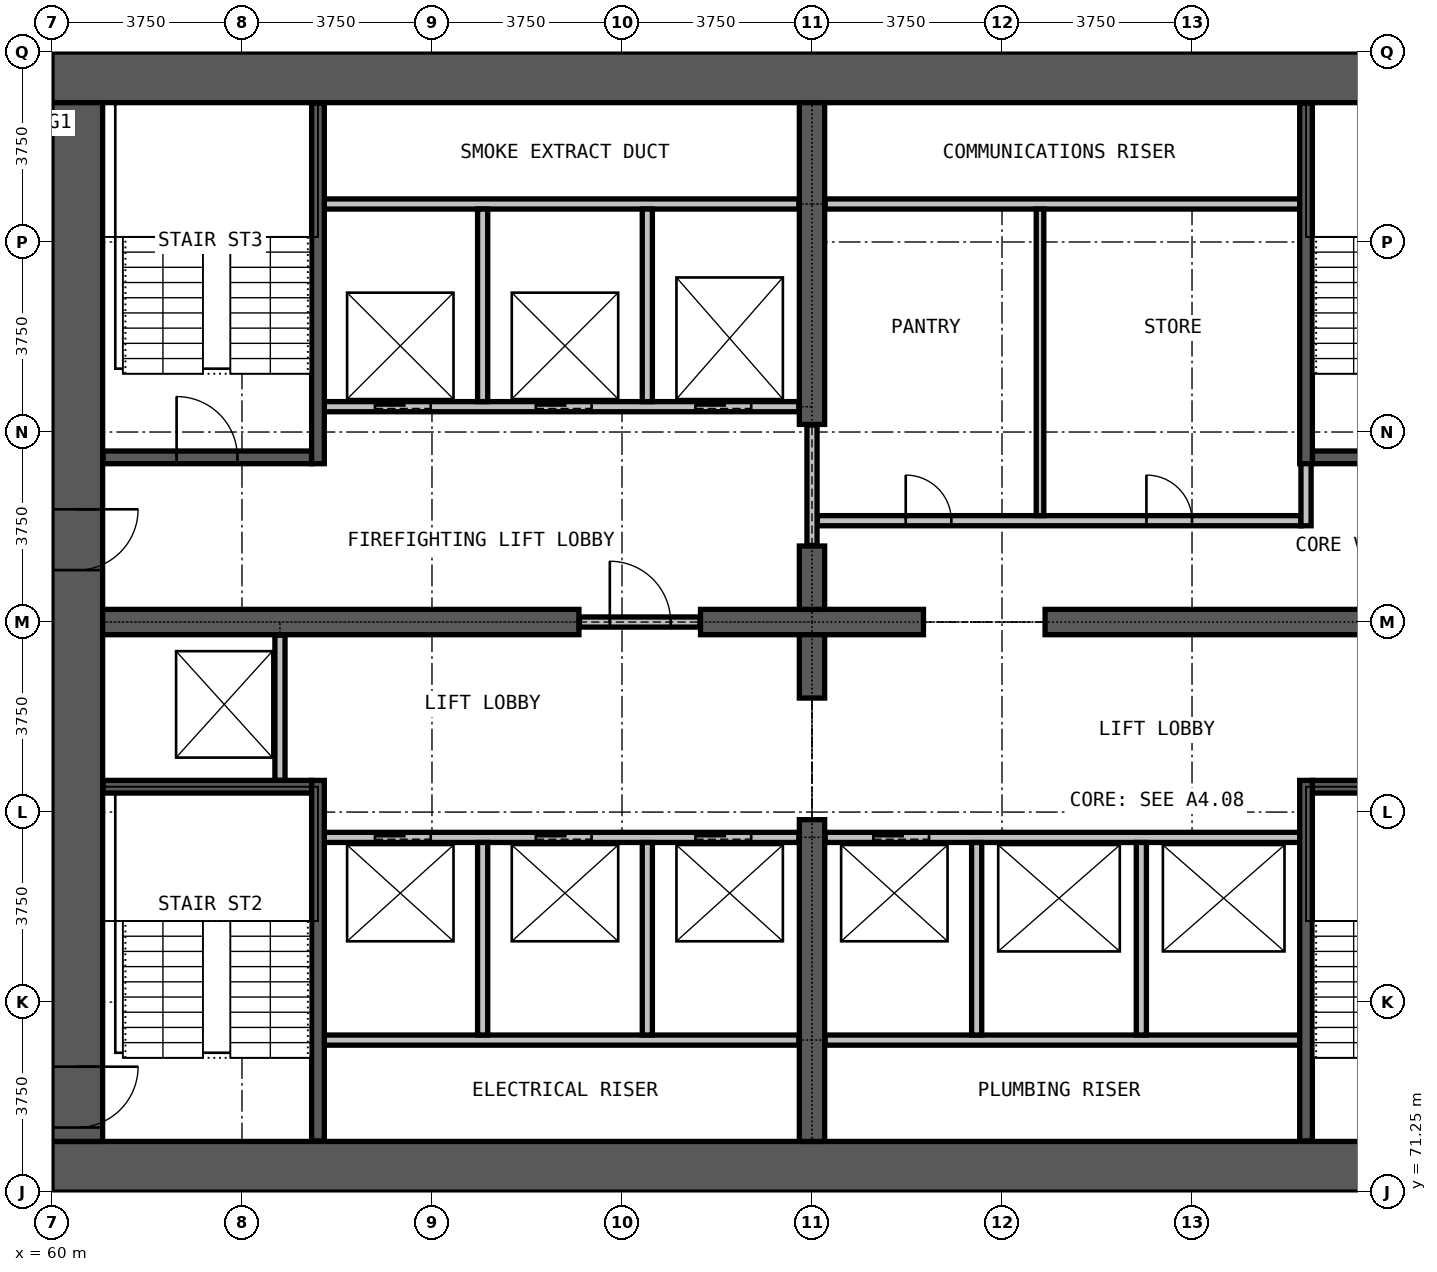
"""IFC4 building model, lengths in metres.
Left out: names, types, materials, properties, quantities, classifications, styles, units other than length and angle.
Written with IfcOpenShell. Run it as: python <this file> out.ifc"""

import sys

from ifc_helpers import new_model, si_unit, direction, frame, frame_2d, origin, place, context, subcontext, project, spatial, rectangle, extrude, element, fill, save


model = new_model("IFC4")
c1 = context("Model", 3, precision=1e-05, world=origin(), true_north=direction((0.0, 1.0)))
c2 = subcontext(c1, "Body", "Model", "MODEL_VIEW")
j1 = project(units=[si_unit("LENGTHUNIT", "METRE"), si_unit("PLANEANGLEUNIT", "RADIAN")], contexts=[c1])
p1 = place(None, origin())
s1 = spatial("IfcSite", under=j1, at=p1, CompositionType="ELEMENT")
p2 = place(p1, origin())
s2 = spatial("IfcBuilding", under=s1, at=p2, CompositionType="ELEMENT")
p3 = place(p2, frame((0.0, 0.0, 85.7)))
s3 = spatial("IfcBuildingStorey", under=s2, at=p3, CompositionType="ELEMENT", Elevation=85.7)
for number, where, z_axis, x_axis in (
    (1, (60.0, 71.75, 0.0), (0.0, 0.0, 1.0), (1.0, 0.0, 0.0)),
    (2, (90.0, 93.25, 0.0), (0.0, 0.0, 1.0), (-1.0, 0.0, 0.0)),
):
    element("IfcWall", number, at=place(p3, frame(where, z_axis=z_axis, x_axis=x_axis)), inside=s3, PredefinedType="SHEAR", context=c2, shape_type="SweptSolid", body=[
        extrude(rectangle(XDim=30.0, YDim=1.0, at=frame_2d((15.0, 0.0))), origin(), (0.0, 0.0, 1.0), 3.3),
    ])
p4 = place(p3, frame((60.5, 92.75, 0.0), z_axis=(0.0, 0.0, 1.0), x_axis=(0.0, -1.0, 0.0)))
e3 = element("IfcWall", 3, at=p4, inside=s3, PredefinedType="SHEAR", context=c2, shape_type="SweptSolid", body=[
    extrude(rectangle(XDim=20.5, YDim=1.0, at=frame_2d((10.25, 0.0))), origin(), (0.0, 0.0, 1.0), 3.3),
])
p5 = place(p4, frame((19.025, 0.0, 0.0)))
e4 = element("IfcOpeningElement", 4, at=p5, cuts=e3, PredefinedType="OPENING", context=c2, shape_type="SweptSolid", body=[
    extrude(rectangle(XDim=1.2, YDim=2.2, at=frame_2d((0.6, 1.1))), frame((0.0, 0.51, 0.0), z_axis=(0.0, -1.0, 0.0), x_axis=(1.0, 0.0, 0.0)), (0.0, 0.0, 1.0), 1.02),
])
p6 = place(p4, frame((8.025, 0.0, 0.0)))
e5 = element("IfcOpeningElement", 5, at=p6, cuts=e3, PredefinedType="OPENING", context=c2, shape_type="SweptSolid", body=[
    extrude(rectangle(XDim=1.2, YDim=2.2, at=frame_2d((0.6, 1.1))), frame((0.0, 0.51, 0.0), z_axis=(0.0, -1.0, 0.0), x_axis=(1.0, 0.0, 0.0)), (0.0, 0.0, 1.0), 1.02),
])
p7 = place(p3, frame((61.0, 82.5, 0.0), z_axis=(0.0, 0.0, 1.0), x_axis=(1.0, 0.0, 0.0)))
e6 = element("IfcWall", 6, at=p7, inside=s3, PredefinedType="SHEAR", context=c2, shape_type="SweptSolid", body=[
    extrude(rectangle(XDim=9.4, YDim=0.5, at=frame_2d((4.7, 0.0))), origin(), (0.0, 0.0, 1.0), 3.3),
])
p8 = place(p3, frame((72.8, 82.5, 0.0), z_axis=(0.0, 0.0, 1.0), x_axis=(1.0, 0.0, 0.0)))
e7 = element("IfcWall", 7, at=p8, inside=s3, PredefinedType="SHEAR", context=c2, shape_type="SweptSolid", body=[
    extrude(rectangle(XDim=4.4, YDim=0.5, at=frame_2d((2.2, 0.0))), origin(), (0.0, 0.0, 1.0), 3.3),
])
p9 = place(p3, frame((79.6, 82.5, 0.0), z_axis=(0.0, 0.0, 1.0), x_axis=(1.0, 0.0, 0.0)))
e8 = element("IfcWall", 8, at=p9, inside=s3, PredefinedType="SHEAR", context=c2, shape_type="SweptSolid", body=[
    extrude(rectangle(XDim=9.4, YDim=0.5, at=frame_2d((4.7, 0.0))), origin(), (0.0, 0.0, 1.0), 3.3),
])
p10 = place(p3, frame((75.0, 72.25, 0.0), z_axis=(0.0, 0.0, 1.0), x_axis=(0.0, 1.0, 0.0)))
e9 = element("IfcWall", 9, at=p10, inside=s3, PredefinedType="SHEAR", context=c2, shape_type="SweptSolid", body=[
    extrude(rectangle(XDim=6.35, YDim=0.5, at=frame_2d((3.175, 0.0))), origin(), (0.0, 0.0, 1.0), 3.3),
])
for number, where, z_axis, x_axis in (
    (10, (75.0, 81.0, 0.0), (0.0, 0.0, 1.0), (0.0, 1.0, 0.0)),
    (11, (75.0, 82.75, 0.0), (0.0, 0.0, 1.0), (0.0, 1.0, 0.0)),
):
    element("IfcWall", number, at=place(p3, frame(where, z_axis=z_axis, x_axis=x_axis)), inside=s3, PredefinedType="SHEAR", context=c2, shape_type="SweptSolid", body=[
        extrude(rectangle(XDim=1.25, YDim=0.5, at=frame_2d((0.625, 0.0))), origin(), (0.0, 0.0, 1.0), 3.3),
    ])
p11 = place(p3, frame((75.0, 86.4, 0.0), z_axis=(0.0, 0.0, 1.0), x_axis=(0.0, 1.0, 0.0)))
e12 = element("IfcWall", 12, at=p11, inside=s3, PredefinedType="SHEAR", context=c2, shape_type="SweptSolid", body=[
    extrude(rectangle(XDim=6.35, YDim=0.5, at=frame_2d((3.175, 0.0))), origin(), (0.0, 0.0, 1.0), 3.3),
])
p12 = place(p3, frame((70.41, 82.5, 0.0), z_axis=(0.0, 0.0, 1.0), x_axis=(1.0, 0.0, 0.0)))
e13 = element("IfcWall", 13, at=p12, inside=s3, PredefinedType="PARTITIONING", context=c2, shape_type="SweptSolid", body=[
    extrude(rectangle(XDim=2.38, YDim=0.2, at=frame_2d((1.19, 0.0))), origin(), (0.0, 0.0, 1.0), 2.4),
])
p13 = place(p12, frame((0.6, 0.0, 0.0)))
e14 = element("IfcOpeningElement", 14, at=p13, cuts=e13, PredefinedType="OPENING", context=c2, shape_type="SweptSolid", body=[
    extrude(rectangle(XDim=1.2, YDim=2.2, at=frame_2d((0.6, 1.1))), frame((0.0, 0.11, 0.0), z_axis=(0.0, -1.0, 0.0), x_axis=(1.0, 0.0, 0.0)), (0.0, 0.0, 1.0), 0.22),
])
p14 = place(p3, frame((75.1, 84.5, 0.0), z_axis=(0.0, 0.0, 1.0), x_axis=(1.0, 0.0, 0.0)))
e15 = element("IfcWall", 15, at=p14, inside=s3, PredefinedType="PARTITIONING", context=c2, shape_type="SweptSolid", body=[
    extrude(rectangle(XDim=9.55, YDim=0.2, at=frame_2d((4.775, 0.0))), origin(), (0.0, 0.0, 1.0), 3.0),
])
p15 = place(p14, frame((1.75, 0.0, 0.0)))
e16 = element("IfcOpeningElement", 16, at=p15, cuts=e15, PredefinedType="OPENING", context=c2, shape_type="SweptSolid", body=[
    extrude(rectangle(XDim=0.9, YDim=2.2, at=frame_2d((0.45, 1.1))), frame((0.0, 0.11, 0.0), z_axis=(0.0, -1.0, 0.0), x_axis=(1.0, 0.0, 0.0)), (0.0, 0.0, 1.0), 0.22),
])
p16 = place(p14, frame((6.5, 0.0, 0.0)))
e17 = element("IfcOpeningElement", 17, at=p16, cuts=e15, PredefinedType="OPENING", context=c2, shape_type="SweptSolid", body=[
    extrude(rectangle(XDim=0.9, YDim=2.2, at=frame_2d((0.45, 1.1))), frame((0.0, 0.11, 0.0), z_axis=(0.0, -1.0, 0.0), x_axis=(1.0, 0.0, 0.0)), (0.0, 0.0, 1.0), 0.22),
])
p17 = place(p3, frame((75.26, 90.75, 0.0), z_axis=(0.0, 0.0, 1.0), x_axis=(1.0, 0.0, 0.0)))
e18 = element("IfcWall", 18, at=p17, inside=s3, PredefinedType="PARTITIONING", context=c2, shape_type="SweptSolid", body=[
    extrude(rectangle(XDim=9.365, YDim=0.2, at=frame_2d((4.683, 0.0))), origin(), (0.0, 0.0, 1.0), 3.0),
])
p18 = place(p3, frame((75.0, 84.01, 0.0), z_axis=(0.0, 0.0, 1.0), x_axis=(0.0, 1.0, 0.0)))
e19 = element("IfcWall", 19, at=p18, inside=s3, PredefinedType="PARTITIONING", context=c2, shape_type="SweptSolid", body=[
    extrude(rectangle(XDim=2.38, YDim=0.2, at=frame_2d((1.19, 0.0))), origin(), (0.0, 0.0, 1.0), 2.4),
])
p19 = place(p3, frame((84.75, 84.4, 0.0), z_axis=(0.0, 0.0, 1.0), x_axis=(0.0, 1.0, 0.0)))
e20 = element("IfcWall", 20, at=p19, inside=s3, PredefinedType="PARTITIONING", context=c2, shape_type="SweptSolid", body=[
    extrude(rectangle(XDim=1.475, YDim=0.2, at=frame_2d((0.738, 0.0))), origin(), (0.0, 0.0, 1.0), 3.0),
])
p20 = place(p3, frame((79.5, 84.6, 0.0), z_axis=(0.0, 0.0, 1.0), x_axis=(0.0, 1.0, 0.0)))
e21 = element("IfcWall", 21, at=p20, inside=s3, PredefinedType="PARTITIONING", context=c2, shape_type="SweptSolid", body=[
    extrude(rectangle(XDim=6.05, YDim=0.15, at=frame_2d((3.025, 0.0))), origin(), (0.0, 0.0, 1.0), 3.0),
])
for number, where, z_axis, x_axis in (
    (22, (65.375, 74.25, 0.0), (0.0, 0.0, 1.0), (1.0, 0.0, 0.0)),
    (23, (75.26, 74.25, 0.0), (0.0, 0.0, 1.0), (1.0, 0.0, 0.0)),
):
    element("IfcWall", number, at=place(p3, frame(where, z_axis=z_axis, x_axis=x_axis)), inside=s3, PredefinedType="PARTITIONING", context=c2, shape_type="SweptSolid", body=[
        extrude(rectangle(XDim=9.365, YDim=0.2, at=frame_2d((4.683, 0.0))), origin(), (0.0, 0.0, 1.0), 3.0),
    ])
p21 = place(p3, frame((65.375, 78.25, 0.0), z_axis=(0.0, 0.0, 1.0), x_axis=(1.0, 0.0, 0.0)))
e24 = element("IfcWall", 24, at=p21, inside=s3, PredefinedType="PARTITIONING", context=c2, shape_type="SweptSolid", body=[
    extrude(rectangle(XDim=9.365, YDim=0.2, at=frame_2d((4.683, 0.0))), origin(), (0.0, 0.0, 1.0), 3.0),
])
p22 = place(p21, frame((1.0, 0.0, 0.0)))
e25 = element("IfcOpeningElement", 25, at=p22, cuts=e24, PredefinedType="OPENING", context=c2, shape_type="SweptSolid", body=[
    extrude(rectangle(XDim=1.1, YDim=2.2, at=frame_2d((0.55, 1.1))), frame((0.0, 0.11, 0.0), z_axis=(0.0, -1.0, 0.0), x_axis=(1.0, 0.0, 0.0)), (0.0, 0.0, 1.0), 0.22),
])
p23 = place(p21, frame((4.175, 0.0, 0.0)))
e26 = element("IfcOpeningElement", 26, at=p23, cuts=e24, PredefinedType="OPENING", context=c2, shape_type="SweptSolid", body=[
    extrude(rectangle(XDim=1.1, YDim=2.2, at=frame_2d((0.55, 1.1))), frame((0.0, 0.11, 0.0), z_axis=(0.0, -1.0, 0.0), x_axis=(1.0, 0.0, 0.0)), (0.0, 0.0, 1.0), 0.22),
])
p24 = place(p21, frame((7.325, 0.0, 0.0)))
e27 = element("IfcOpeningElement", 27, at=p24, cuts=e24, PredefinedType="OPENING", context=c2, shape_type="SweptSolid", body=[
    extrude(rectangle(XDim=1.1, YDim=2.2, at=frame_2d((0.55, 1.1))), frame((0.0, 0.11, 0.0), z_axis=(0.0, -1.0, 0.0), x_axis=(1.0, 0.0, 0.0)), (0.0, 0.0, 1.0), 0.22),
])
p25 = place(p3, frame((75.26, 78.25, 0.0), z_axis=(0.0, 0.0, 1.0), x_axis=(1.0, 0.0, 0.0)))
e28 = element("IfcWall", 28, at=p25, inside=s3, PredefinedType="PARTITIONING", context=c2, shape_type="SweptSolid", body=[
    extrude(rectangle(XDim=9.365, YDim=0.2, at=frame_2d((4.683, 0.0))), origin(), (0.0, 0.0, 1.0), 3.0),
])
p26 = place(p25, frame((0.95, 0.0, 0.0)))
e29 = element("IfcOpeningElement", 29, at=p26, cuts=e28, PredefinedType="OPENING", context=c2, shape_type="SweptSolid", body=[
    extrude(rectangle(XDim=1.1, YDim=2.2, at=frame_2d((0.55, 1.1))), frame((0.0, 0.11, 0.0), z_axis=(0.0, -1.0, 0.0), x_axis=(1.0, 0.0, 0.0)), (0.0, 0.0, 1.0), 0.22),
])
p27 = place(p3, frame((65.375, 86.75, 0.0), z_axis=(0.0, 0.0, 1.0), x_axis=(1.0, 0.0, 0.0)))
e30 = element("IfcWall", 30, at=p27, inside=s3, PredefinedType="PARTITIONING", context=c2, shape_type="SweptSolid", body=[
    extrude(rectangle(XDim=9.365, YDim=0.2, at=frame_2d((4.683, 0.0))), origin(), (0.0, 0.0, 1.0), 3.0),
])
p28 = place(p27, frame((1.0, 0.0, 0.0)))
e31 = element("IfcOpeningElement", 31, at=p28, cuts=e30, PredefinedType="OPENING", context=c2, shape_type="SweptSolid", body=[
    extrude(rectangle(XDim=1.1, YDim=2.2, at=frame_2d((0.55, 1.1))), frame((0.0, 0.11, 0.0), z_axis=(0.0, -1.0, 0.0), x_axis=(1.0, 0.0, 0.0)), (0.0, 0.0, 1.0), 0.22),
])
p29 = place(p27, frame((4.175, 0.0, 0.0)))
e32 = element("IfcOpeningElement", 32, at=p29, cuts=e30, PredefinedType="OPENING", context=c2, shape_type="SweptSolid", body=[
    extrude(rectangle(XDim=1.1, YDim=2.2, at=frame_2d((0.55, 1.1))), frame((0.0, 0.11, 0.0), z_axis=(0.0, -1.0, 0.0), x_axis=(1.0, 0.0, 0.0)), (0.0, 0.0, 1.0), 0.22),
])
p30 = place(p27, frame((7.325, 0.0, 0.0)))
e33 = element("IfcOpeningElement", 33, at=p30, cuts=e30, PredefinedType="OPENING", context=c2, shape_type="SweptSolid", body=[
    extrude(rectangle(XDim=1.1, YDim=2.2, at=frame_2d((0.55, 1.1))), frame((0.0, 0.11, 0.0), z_axis=(0.0, -1.0, 0.0), x_axis=(1.0, 0.0, 0.0)), (0.0, 0.0, 1.0), 0.22),
])
p31 = place(p3, frame((65.375, 90.75, 0.0), z_axis=(0.0, 0.0, 1.0), x_axis=(1.0, 0.0, 0.0)))
e34 = element("IfcWall", 34, at=p31, inside=s3, PredefinedType="PARTITIONING", context=c2, shape_type="SweptSolid", body=[
    extrude(rectangle(XDim=9.365, YDim=0.2, at=frame_2d((4.683, 0.0))), origin(), (0.0, 0.0, 1.0), 3.0),
])
p32 = place(p3, frame((64.5, 79.375, 0.0), z_axis=(0.0, 0.0, 1.0), x_axis=(0.0, 1.0, 0.0)))
e35 = element("IfcWall", 35, at=p32, inside=s3, PredefinedType="PARTITIONING", context=c2, shape_type="SweptSolid", body=[
    extrude(rectangle(XDim=2.865, YDim=0.2, at=frame_2d((1.433, 0.0))), origin(), (0.0, 0.0, 1.0), 3.0),
])
for number, where, z_axis, x_axis in (
    (36, (68.5, 74.35, 0.0), (0.0, 0.0, 1.0), (0.0, 1.0, 0.0)),
    (37, (68.5, 86.85, 0.0), (0.0, 0.0, 1.0), (0.0, 1.0, 0.0)),
    (38, (71.75, 74.35, 0.0), (0.0, 0.0, 1.0), (0.0, 1.0, 0.0)),
    (39, (71.75, 86.85, 0.0), (0.0, 0.0, 1.0), (0.0, 1.0, 0.0)),
    (40, (78.25, 74.35, 0.0), (0.0, 0.0, 1.0), (0.0, 1.0, 0.0)),
    (41, (81.5, 74.35, 0.0), (0.0, 0.0, 1.0), (0.0, 1.0, 0.0)),
):
    element("IfcWall", number, at=place(p3, frame(where, z_axis=z_axis, x_axis=x_axis)), inside=s3, PredefinedType="PARTITIONING", context=c2, shape_type="SweptSolid", body=[
        extrude(rectangle(XDim=3.8, YDim=0.2, at=frame_2d((1.9, 0.0))), origin(), (0.0, 0.0, 1.0), 3.0),
    ])
for number, where, z_axis, x_axis in (
    (42, (61.01, 79.25, 0.0), (0.0, 0.0, 1.0), (1.0, 0.0, 0.0)),
    (43, (84.875, 79.25, 0.0), (0.0, 0.0, 1.0), (1.0, 0.0, 0.0)),
):
    element("IfcWall", number, at=place(p3, frame(where, z_axis=z_axis, x_axis=x_axis)), inside=s3, PredefinedType="PARTITIONING", context=c2, shape_type="SweptSolid", body=[
        extrude(rectangle(XDim=4.115, YDim=0.25, at=frame_2d((2.058, 0.0))), origin(), (0.0, 0.0, 1.0), 3.0),
    ])
p33 = place(p3, frame((61.01, 85.75, 0.0), z_axis=(0.0, 0.0, 1.0), x_axis=(1.0, 0.0, 0.0)))
e44 = element("IfcWall", 44, at=p33, inside=s3, PredefinedType="PARTITIONING", context=c2, shape_type="SweptSolid", body=[
    extrude(rectangle(XDim=4.115, YDim=0.25, at=frame_2d((2.058, 0.0))), origin(), (0.0, 0.0, 1.0), 3.0),
])
p34 = place(p33, frame((1.45, 0.0, 0.0)))
e45 = element("IfcOpeningElement", 45, at=p34, cuts=e44, PredefinedType="OPENING", context=c2, shape_type="SweptSolid", body=[
    extrude(rectangle(XDim=1.2, YDim=2.2, at=frame_2d((0.6, 1.1))), frame((0.0, 0.135, 0.0), z_axis=(0.0, -1.0, 0.0), x_axis=(1.0, 0.0, 0.0)), (0.0, 0.0, 1.0), 0.27),
])
p35 = place(p3, frame((84.875, 85.75, 0.0), z_axis=(0.0, 0.0, 1.0), x_axis=(1.0, 0.0, 0.0)))
e46 = element("IfcWall", 46, at=p35, inside=s3, PredefinedType="PARTITIONING", context=c2, shape_type="SweptSolid", body=[
    extrude(rectangle(XDim=4.115, YDim=0.25, at=frame_2d((2.058, 0.0))), origin(), (0.0, 0.0, 1.0), 3.0),
])
for number, where, z_axis, x_axis in (
    (47, (65.25, 72.26, 0.0), (0.0, 0.0, 1.0), (0.0, 1.0, 0.0)),
    (48, (65.25, 85.625, 0.0), (0.0, 0.0, 1.0), (0.0, 1.0, 0.0)),
    (49, (84.75, 72.26, 0.0), (0.0, 0.0, 1.0), (0.0, 1.0, 0.0)),
    (50, (84.75, 85.625, 0.0), (0.0, 0.0, 1.0), (0.0, 1.0, 0.0)),
):
    element("IfcWall", number, at=place(p3, frame(where, z_axis=z_axis, x_axis=x_axis)), inside=s3, PredefinedType="PARTITIONING", context=c2, shape_type="SweptSolid", body=[
        extrude(rectangle(XDim=7.115, YDim=0.25, at=frame_2d((3.558, 0.0))), origin(), (0.0, 0.0, 1.0), 3.0),
    ])
p36 = place(p22, origin())
e51 = element("IfcDoor", 51, at=p36, inside=s3, OperationType="DOUBLE_DOOR_SLIDING", PredefinedType="DOOR", context=c2, shape_type="SweptSolid", body=[
    extrude(rectangle(XDim=1.1, YDim=2.2, at=frame_2d((0.55, 1.1))), frame((0.0, 0.025, 0.0), z_axis=(0.0, -1.0, 0.0), x_axis=(1.0, 0.0, 0.0)), (0.0, 0.0, 1.0), 0.05),
])
fill(e25, e51)
p37 = place(p23, origin())
e52 = element("IfcDoor", 52, at=p37, inside=s3, OperationType="DOUBLE_DOOR_SLIDING", PredefinedType="DOOR", context=c2, shape_type="SweptSolid", body=[
    extrude(rectangle(XDim=1.1, YDim=2.2, at=frame_2d((0.55, 1.1))), frame((0.0, 0.025, 0.0), z_axis=(0.0, -1.0, 0.0), x_axis=(1.0, 0.0, 0.0)), (0.0, 0.0, 1.0), 0.05),
])
fill(e26, e52)
p38 = place(p24, origin())
e53 = element("IfcDoor", 53, at=p38, inside=s3, OperationType="DOUBLE_DOOR_SLIDING", PredefinedType="DOOR", context=c2, shape_type="SweptSolid", body=[
    extrude(rectangle(XDim=1.1, YDim=2.2, at=frame_2d((0.55, 1.1))), frame((0.0, 0.025, 0.0), z_axis=(0.0, -1.0, 0.0), x_axis=(1.0, 0.0, 0.0)), (0.0, 0.0, 1.0), 0.05),
])
fill(e27, e53)
p39 = place(p26, origin())
e54 = element("IfcDoor", 54, at=p39, inside=s3, OperationType="DOUBLE_DOOR_SLIDING", PredefinedType="DOOR", context=c2, shape_type="SweptSolid", body=[
    extrude(rectangle(XDim=1.1, YDim=2.2, at=frame_2d((0.55, 1.1))), frame((0.0, 0.025, 0.0), z_axis=(0.0, -1.0, 0.0), x_axis=(1.0, 0.0, 0.0)), (0.0, 0.0, 1.0), 0.05),
])
fill(e29, e54)
p40 = place(p28, origin())
e55 = element("IfcDoor", 55, at=p40, inside=s3, OperationType="DOUBLE_DOOR_SLIDING", PredefinedType="DOOR", context=c2, shape_type="SweptSolid", body=[
    extrude(rectangle(XDim=1.1, YDim=2.2, at=frame_2d((0.55, 1.1))), frame((0.0, 0.025, 0.0), z_axis=(0.0, -1.0, 0.0), x_axis=(1.0, 0.0, 0.0)), (0.0, 0.0, 1.0), 0.05),
])
fill(e31, e55)
p41 = place(p29, origin())
e56 = element("IfcDoor", 56, at=p41, inside=s3, OperationType="DOUBLE_DOOR_SLIDING", PredefinedType="DOOR", context=c2, shape_type="SweptSolid", body=[
    extrude(rectangle(XDim=1.1, YDim=2.2, at=frame_2d((0.55, 1.1))), frame((0.0, 0.025, 0.0), z_axis=(0.0, -1.0, 0.0), x_axis=(1.0, 0.0, 0.0)), (0.0, 0.0, 1.0), 0.05),
])
fill(e32, e56)
p42 = place(p30, origin())
e57 = element("IfcDoor", 57, at=p42, inside=s3, OperationType="DOUBLE_DOOR_SLIDING", PredefinedType="DOOR", context=c2, shape_type="SweptSolid", body=[
    extrude(rectangle(XDim=1.1, YDim=2.2, at=frame_2d((0.55, 1.1))), frame((0.0, 0.025, 0.0), z_axis=(0.0, -1.0, 0.0), x_axis=(1.0, 0.0, 0.0)), (0.0, 0.0, 1.0), 0.05),
])
fill(e33, e57)
p43 = place(p13, origin())
e58 = element("IfcDoor", 58, at=p43, inside=s3, OperationType="SINGLE_SWING_LEFT", PredefinedType="DOOR", context=c2, shape_type="SweptSolid", body=[
    extrude(rectangle(XDim=1.2, YDim=2.2, at=frame_2d((0.6, 1.1))), frame((0.0, 0.025, 0.0), z_axis=(0.0, -1.0, 0.0), x_axis=(1.0, 0.0, 0.0)), (0.0, 0.0, 1.0), 0.05),
])
fill(e14, e58)
p44 = place(p34, origin())
e59 = element("IfcDoor", 59, at=p44, inside=s3, OperationType="SINGLE_SWING_LEFT", PredefinedType="DOOR", context=c2, shape_type="SweptSolid", body=[
    extrude(rectangle(XDim=1.2, YDim=2.2, at=frame_2d((0.6, 1.1))), frame((0.0, 0.025, 0.0), z_axis=(0.0, -1.0, 0.0), x_axis=(1.0, 0.0, 0.0)), (0.0, 0.0, 1.0), 0.05),
])
fill(e45, e59)
p45 = place(p5, origin())
e60 = element("IfcDoor", 60, at=p45, inside=s3, OperationType="SINGLE_SWING_LEFT", PredefinedType="DOOR", context=c2, shape_type="SweptSolid", body=[
    extrude(rectangle(XDim=1.2, YDim=2.2, at=frame_2d((0.6, 1.1))), frame((0.0, 0.025, 0.0), z_axis=(0.0, -1.0, 0.0), x_axis=(1.0, 0.0, 0.0)), (0.0, 0.0, 1.0), 0.05),
])
fill(e4, e60)
p46 = place(p6, origin())
e61 = element("IfcDoor", 61, at=p46, inside=s3, OperationType="SINGLE_SWING_LEFT", PredefinedType="DOOR", context=c2, shape_type="SweptSolid", body=[
    extrude(rectangle(XDim=1.2, YDim=2.2, at=frame_2d((0.6, 1.1))), frame((0.0, 0.025, 0.0), z_axis=(0.0, -1.0, 0.0), x_axis=(1.0, 0.0, 0.0)), (0.0, 0.0, 1.0), 0.05),
])
fill(e5, e61)
p47 = place(p15, origin())
e62 = element("IfcDoor", 62, at=p47, inside=s3, OperationType="SINGLE_SWING_RIGHT", PredefinedType="DOOR", context=c2, shape_type="SweptSolid", body=[
    extrude(rectangle(XDim=0.9, YDim=2.2, at=frame_2d((0.45, 1.1))), frame((0.0, 0.025, 0.0), z_axis=(0.0, -1.0, 0.0), x_axis=(1.0, 0.0, 0.0)), (0.0, 0.0, 1.0), 0.05),
])
fill(e16, e62)
p48 = place(p16, origin())
e63 = element("IfcDoor", 63, at=p48, inside=s3, OperationType="SINGLE_SWING_LEFT", PredefinedType="DOOR", context=c2, shape_type="SweptSolid", body=[
    extrude(rectangle(XDim=0.9, YDim=2.2, at=frame_2d((0.45, 1.1))), frame((0.0, 0.025, 0.0), z_axis=(0.0, -1.0, 0.0), x_axis=(1.0, 0.0, 0.0)), (0.0, 0.0, 1.0), 0.05),
])
fill(e17, e63)
save(model, sys.argv[1])
